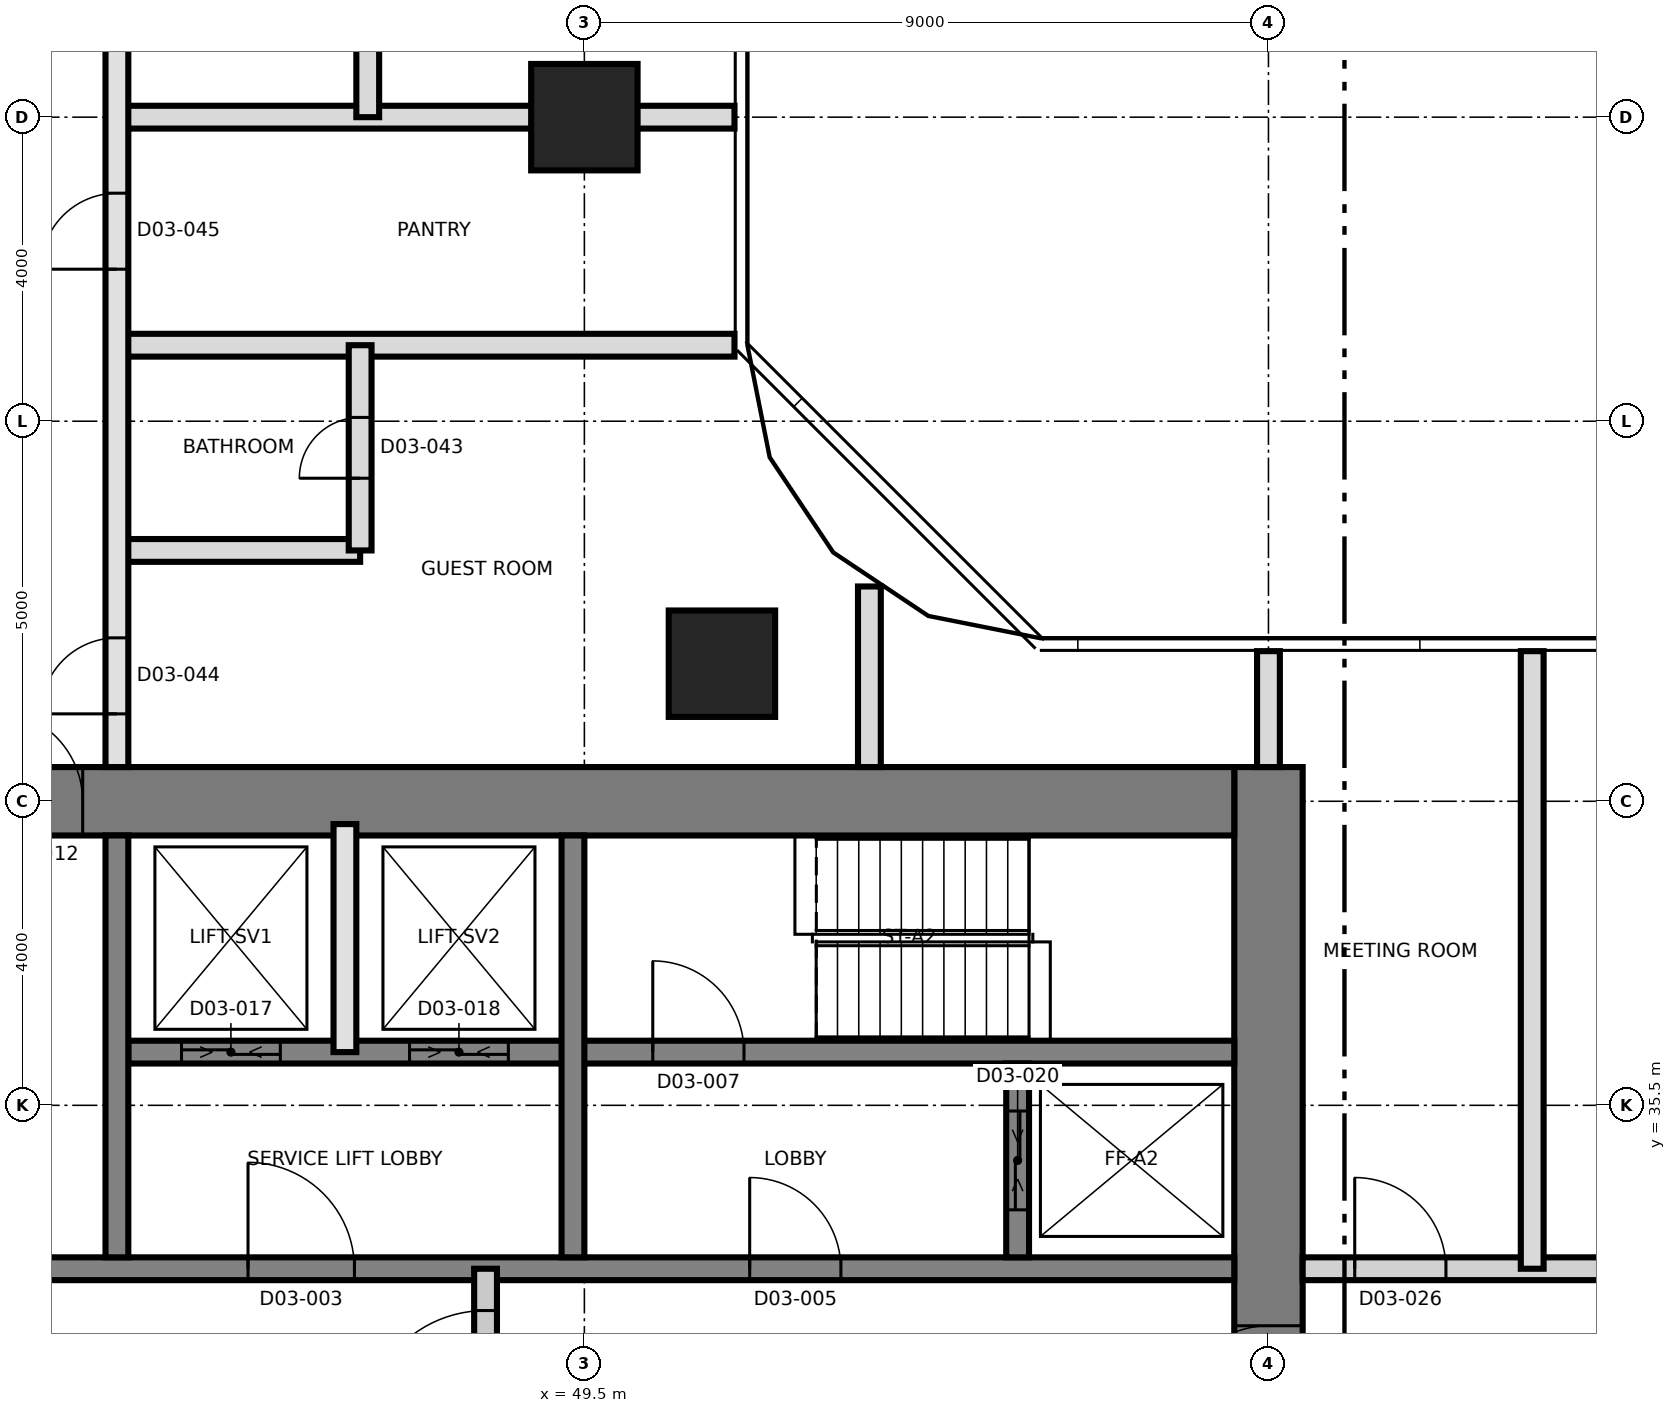
"""IFC4 building model, lengths in metres.
Left out: names, types, materials, properties, quantities, classifications, styles, units other than length and angle.
Written with IfcOpenShell. Run it as: python <this file> out.ifc"""

import sys

from ifc_helpers import new_model, si_unit, direction, frame, frame_2d, origin, origin_2d, place, context, subcontext, project, spatial, rectangle, extrude, element, fill, save


model = new_model("IFC4")
c1 = context("Model", 3, precision=1e-05, world=origin(), true_north=direction((0.0, 1.0)))
c2 = subcontext(c1, "Body", "Model", "MODEL_VIEW")
j1 = project(units=[si_unit("LENGTHUNIT", "METRE"), si_unit("PLANEANGLEUNIT", "RADIAN")], contexts=[c1])
p1 = place(None, origin())
s1 = spatial("IfcSite", under=j1, at=p1, CompositionType="ELEMENT")
p2 = place(p1, origin())
s2 = spatial("IfcBuilding", under=s1, at=p2, CompositionType="ELEMENT")
p3 = place(p2, frame((0.0, 0.0, 52.0)))
s3 = spatial("IfcBuildingStorey", under=s2, at=p3, CompositionType="ELEMENT", Elevation=52.0)
p4 = place(p3, frame((58.5, 21.05, 0.0), z_axis=(0.0, 0.0, 1.0), x_axis=(0.0, 1.0, 0.0)))
e1 = element("IfcWall", 1, at=p4, inside=s3, PredefinedType="SHEAR", context=c2, shape_type="SweptSolid", body=[
    extrude(rectangle(XDim=18.9, YDim=0.9, at=frame_2d((9.45, 0.0))), origin(), (0.0, 0.0, 1.0), 3.7),
])
p5 = place(p4, frame((10.35, 0.0, 0.0)))
e2 = element("IfcOpeningElement", 2, at=p5, cuts=e1, PredefinedType="OPENING", context=c2, shape_type="SweptSolid", body=[
    extrude(rectangle(XDim=1.2, YDim=2.1, at=frame_2d((0.6, 1.05))), frame((0.0, 0.46, 0.0), z_axis=(0.0, -1.0, 0.0), x_axis=(1.0, 0.0, 0.0)), (0.0, 0.0, 1.0), 0.92),
])
p6 = place(p3, frame((31.05, 39.5, 0.0), z_axis=(0.0, 0.0, 1.0), x_axis=(1.0, 0.0, 0.0)))
e3 = element("IfcWall", 3, at=p6, inside=s3, PredefinedType="SHEAR", context=c2, shape_type="SweptSolid", body=[
    extrude(rectangle(XDim=27.0, YDim=0.9, at=frame_2d((13.5, 0.0))), origin(), (0.0, 0.0, 1.0), 3.7),
])
p7 = place(p6, frame((10.65, 0.0, 0.0)))
e4 = element("IfcOpeningElement", 4, at=p7, cuts=e3, PredefinedType="OPENING", context=c2, shape_type="SweptSolid", body=[
    extrude(rectangle(XDim=1.2, YDim=2.1, at=frame_2d((0.6, 1.05))), frame((0.0, 0.46, 0.0), z_axis=(0.0, -1.0, 0.0), x_axis=(1.0, 0.0, 0.0)), (0.0, 0.0, 1.0), 0.92),
])
p8 = place(p3, frame((31.95, 33.35, 0.0), z_axis=(0.0, 0.0, 1.0), x_axis=(1.0, 0.0, 0.0)))
e5 = element("IfcWall", 5, at=p8, inside=s3, PredefinedType="SHEAR", context=c2, shape_type="SweptSolid", body=[
    extrude(rectangle(XDim=26.1, YDim=0.3, at=frame_2d((13.05, 0.0))), origin(), (0.0, 0.0, 1.0), 3.7),
])
p9 = place(p8, frame((13.125, 0.0, 0.0)))
e6 = element("IfcOpeningElement", 6, at=p9, cuts=e5, PredefinedType="OPENING", context=c2, shape_type="SweptSolid", body=[
    extrude(rectangle(XDim=1.4, YDim=2.1, at=frame_2d((0.7, 1.05))), frame((0.0, 0.16, 0.0), z_axis=(0.0, -1.0, 0.0), x_axis=(1.0, 0.0, 0.0)), (0.0, 0.0, 1.0), 0.32),
])
p10 = place(p8, frame((5.175, 0.0, 0.0)))
e7 = element("IfcOpeningElement", 7, at=p10, cuts=e5, PredefinedType="OPENING", context=c2, shape_type="SweptSolid", body=[
    extrude(rectangle(XDim=1.2, YDim=2.1, at=frame_2d((0.6, 1.05))), frame((0.0, 0.16, 0.0), z_axis=(0.0, -1.0, 0.0), x_axis=(1.0, 0.0, 0.0)), (0.0, 0.0, 1.0), 0.32),
])
p11 = place(p8, frame((19.725, 0.0, 0.0)))
e8 = element("IfcOpeningElement", 8, at=p11, cuts=e5, PredefinedType="OPENING", context=c2, shape_type="SweptSolid", body=[
    extrude(rectangle(XDim=1.2, YDim=2.1, at=frame_2d((0.6, 1.05))), frame((0.0, 0.16, 0.0), z_axis=(0.0, -1.0, 0.0), x_axis=(1.0, 0.0, 0.0)), (0.0, 0.0, 1.0), 0.32),
])
p12 = place(p3, frame((43.5, 36.2, 0.0), z_axis=(0.0, 0.0, 1.0), x_axis=(1.0, 0.0, 0.0)))
e9 = element("IfcWall", 9, at=p12, inside=s3, PredefinedType="SHEAR", context=c2, shape_type="SweptSolid", body=[
    extrude(rectangle(XDim=14.55, YDim=0.3, at=frame_2d((7.275, 0.0))), origin(), (0.0, 0.0, 1.0), 3.7),
])
p13 = place(p12, frame((6.9, 0.0, 0.0)))
e10 = element("IfcOpeningElement", 10, at=p13, cuts=e9, PredefinedType="OPENING", context=c2, shape_type="SweptSolid", body=[
    extrude(rectangle(XDim=1.2, YDim=2.1, at=frame_2d((0.6, 1.05))), frame((0.0, 0.16, 0.0), z_axis=(0.0, -1.0, 0.0), x_axis=(1.0, 0.0, 0.0)), (0.0, 0.0, 1.0), 0.32),
])
p14 = place(p12, frame((0.7, 0.0, 0.0)))
e11 = element("IfcOpeningElement", 11, at=p14, cuts=e9, PredefinedType="OPENING", context=c2, shape_type="SweptSolid", body=[
    extrude(rectangle(XDim=1.3, YDim=2.4, at=frame_2d((0.65, 1.2))), frame((0.0, 0.16, 0.0), z_axis=(0.0, -1.0, 0.0), x_axis=(1.0, 0.0, 0.0)), (0.0, 0.0, 1.0), 0.32),
])
p15 = place(p12, frame((3.7, 0.0, 0.0)))
e12 = element("IfcOpeningElement", 12, at=p15, cuts=e9, PredefinedType="OPENING", context=c2, shape_type="SweptSolid", body=[
    extrude(rectangle(XDim=1.3, YDim=2.4, at=frame_2d((0.65, 1.2))), frame((0.0, 0.16, 0.0), z_axis=(0.0, -1.0, 0.0), x_axis=(1.0, 0.0, 0.0)), (0.0, 0.0, 1.0), 0.32),
])
for number, where, z_axis, x_axis in (
    (13, (43.35, 33.5, 0.0), (0.0, 0.0, 1.0), (0.0, 1.0, 0.0)),
    (14, (49.35, 33.5, 0.0), (0.0, 0.0, 1.0), (0.0, 1.0, 0.0)),
):
    element("IfcWall", number, at=place(p3, frame(where, z_axis=z_axis, x_axis=x_axis)), inside=s3, PredefinedType="SHEAR", context=c2, shape_type="SweptSolid", body=[
        extrude(rectangle(XDim=5.55, YDim=0.3, at=frame_2d((2.775, 0.0))), origin(), (0.0, 0.0, 1.0), 3.7),
    ])
p16 = place(p3, frame((55.2, 33.5, 0.0), z_axis=(0.0, 0.0, 1.0), x_axis=(0.0, 1.0, 0.0)))
e15 = element("IfcWall", 15, at=p16, inside=s3, PredefinedType="SHEAR", context=c2, shape_type="SweptSolid", body=[
    extrude(rectangle(XDim=2.55, YDim=0.3, at=frame_2d((1.275, 0.0))), origin(), (0.0, 0.0, 1.0), 3.7),
])
p17 = place(p16, frame((0.625, 0.0, 0.0)))
e16 = element("IfcOpeningElement", 16, at=p17, cuts=e15, PredefinedType="OPENING", context=c2, shape_type="SweptSolid", body=[
    extrude(rectangle(XDim=1.3, YDim=2.4, at=frame_2d((0.65, 1.2))), frame((0.0, 0.16, 0.0), z_axis=(0.0, -1.0, 0.0), x_axis=(1.0, 0.0, 0.0)), (0.0, 0.0, 1.0), 0.32),
])
for number, where, z_axis, x_axis in (
    (17, (51.31, 41.31, 0.0), (0.0, 0.0, 1.0), (1.0, 0.0, 0.0)),
    (18, (49.5, 48.5, 0.0), (0.0, 0.0, 1.0), (1.0, 0.0, 0.0)),
):
    element("IfcColumn", number, at=place(p3, frame(where, z_axis=z_axis, x_axis=x_axis)), inside=s3, PredefinedType="COLUMN", context=c2, shape_type="SweptSolid", body=[
        extrude(rectangle(XDim=1.4, YDim=1.4, at=origin_2d()), origin(), (0.0, 0.0, 1.0), 3.7),
    ])
p18 = place(p3, frame((46.35, 36.2, 0.0), z_axis=(0.0, 0.0, 1.0), x_axis=(0.0, 1.0, 0.0)))
e19 = element("IfcWall", 19, at=p18, inside=s3, PredefinedType="SOLIDWALL", context=c2, shape_type="SweptSolid", body=[
    extrude(rectangle(XDim=3.0, YDim=0.3, at=frame_2d((1.5, 0.0))), origin(), (0.0, 0.0, 1.0), 3.4),
])
p19 = place(p3, frame((48.2, 24.9, 0.0), z_axis=(0.0, 0.0, 1.0), x_axis=(0.0, 1.0, 0.0)))
e20 = element("IfcWall", 20, at=p19, inside=s3, PredefinedType="PARTITIONING", context=c2, shape_type="SweptSolid", body=[
    extrude(rectangle(XDim=8.45, YDim=0.3, at=frame_2d((4.225, 0.0))), origin(), (0.0, 0.0, 1.0), 3.4),
])
p20 = place(p19, frame((6.3, 0.0, 0.0)))
e21 = element("IfcOpeningElement", 21, at=p20, cuts=e20, PredefinedType="OPENING", context=c2, shape_type="SweptSolid", body=[
    extrude(rectangle(XDim=1.6, YDim=2.1, at=frame_2d((0.8, 1.05))), frame((0.0, 0.16, 0.0), z_axis=(0.0, -1.0, 0.0), x_axis=(1.0, 0.0, 0.0)), (0.0, 0.0, 1.0), 0.32),
])
p21 = place(p3, frame((58.95, 33.35, 0.0), z_axis=(0.0, 0.0, 1.0), x_axis=(1.0, 0.0, 0.0)))
e22 = element("IfcWall", 22, at=p21, inside=s3, PredefinedType="PARTITIONING", context=c2, shape_type="SweptSolid", body=[
    extrude(rectangle(XDim=26.38, YDim=0.3, at=frame_2d((13.19, 0.0))), origin(), (0.0, 0.0, 1.0), 3.4),
])
p22 = place(p21, frame((0.685, 0.0, 0.0)))
e23 = element("IfcOpeningElement", 23, at=p22, cuts=e22, PredefinedType="OPENING", context=c2, shape_type="SweptSolid", body=[
    extrude(rectangle(XDim=1.2, YDim=2.1, at=frame_2d((0.6, 1.05))), frame((0.0, 0.16, 0.0), z_axis=(0.0, -1.0, 0.0), x_axis=(1.0, 0.0, 0.0)), (0.0, 0.0, 1.0), 0.32),
])
p23 = place(p21, frame((3.935, 0.0, 0.0)))
e24 = element("IfcOpeningElement", 24, at=p23, cuts=e22, PredefinedType="OPENING", context=c2, shape_type="SweptSolid", body=[
    extrude(rectangle(XDim=1.0, YDim=2.1, at=frame_2d((0.5, 1.05))), frame((0.0, 0.16, 0.0), z_axis=(0.0, -1.0, 0.0), x_axis=(1.0, 0.0, 0.0)), (0.0, 0.0, 1.0), 0.32),
])
p24 = place(p21, frame((14.2, 0.0, 0.0)))
e25 = element("IfcOpeningElement", 25, at=p24, cuts=e22, PredefinedType="OPENING", context=c2, shape_type="SweptSolid", body=[
    extrude(rectangle(XDim=1.0, YDim=2.4, at=frame_2d((0.5, 1.2))), frame((0.0, 0.16, 0.0), z_axis=(0.0, -1.0, 0.0), x_axis=(1.0, 0.0, 0.0)), (0.0, 0.0, 1.0), 0.32),
])
p25 = place(p21, frame((19.25, 0.0, 0.0)))
e26 = element("IfcOpeningElement", 26, at=p25, cuts=e22, PredefinedType="OPENING", context=c2, shape_type="SweptSolid", body=[
    extrude(rectangle(XDim=1.2, YDim=2.1, at=frame_2d((0.6, 1.05))), frame((0.0, 0.16, 0.0), z_axis=(0.0, -1.0, 0.0), x_axis=(1.0, 0.0, 0.0)), (0.0, 0.0, 1.0), 0.32),
])
p26 = place(p21, frame((22.5, 0.0, 0.0)))
e27 = element("IfcOpeningElement", 27, at=p26, cuts=e22, PredefinedType="OPENING", context=c2, shape_type="SweptSolid", body=[
    extrude(rectangle(XDim=1.0, YDim=2.1, at=frame_2d((0.5, 1.05))), frame((0.0, 0.16, 0.0), z_axis=(0.0, -1.0, 0.0), x_axis=(1.0, 0.0, 0.0)), (0.0, 0.0, 1.0), 0.32),
])
p27 = place(p3, frame((43.35, 42.8, 0.0), z_axis=(0.0, 0.0, 1.0), x_axis=(1.0, 0.0, 0.0)))
e28 = element("IfcWall", 28, at=p27, inside=s3, PredefinedType="PARTITIONING", context=c2, shape_type="SweptSolid", body=[
    extrude(rectangle(XDim=3.2, YDim=0.3, at=frame_2d((1.6, 0.0))), origin(), (0.0, 0.0, 1.0), 3.4),
])
for number, where, z_axis, x_axis in (
    (29, (43.35, 45.5, 0.0), (0.0, 0.0, 1.0), (1.0, 0.0, 0.0)),
    (30, (43.35, 48.5, 0.0), (0.0, 0.0, 1.0), (1.0, 0.0, 0.0)),
):
    element("IfcWall", number, at=place(p3, frame(where, z_axis=z_axis, x_axis=x_axis)), inside=s3, PredefinedType="PARTITIONING", context=c2, shape_type="SweptSolid", body=[
        extrude(rectangle(XDim=8.125, YDim=0.3, at=frame_2d((4.062, 0.0))), origin(), (0.0, 0.0, 1.0), 3.4),
    ])
p28 = place(p3, frame((43.35, 39.95, 0.0), z_axis=(0.0, 0.0, 1.0), x_axis=(0.0, 1.0, 0.0)))
e31 = element("IfcWall", 31, at=p28, inside=s3, PredefinedType="SOLIDWALL", context=c2, shape_type="SweptSolid", body=[
    extrude(rectangle(XDim=25.85, YDim=0.3, at=frame_2d((12.925, 0.0))), origin(), (0.0, 0.0, 1.0), 3.4),
])
p29 = place(p28, frame((0.7, 0.0, 0.0)))
e32 = element("IfcOpeningElement", 32, at=p29, cuts=e31, PredefinedType="OPENING", context=c2, shape_type="SweptSolid", body=[
    extrude(rectangle(XDim=1.0, YDim=2.1, at=frame_2d((0.5, 1.05))), frame((0.0, 0.16, 0.0), z_axis=(0.0, -1.0, 0.0), x_axis=(1.0, 0.0, 0.0)), (0.0, 0.0, 1.0), 0.32),
])
p30 = place(p28, frame((6.55, 0.0, 0.0)))
e33 = element("IfcOpeningElement", 33, at=p30, cuts=e31, PredefinedType="OPENING", context=c2, shape_type="SweptSolid", body=[
    extrude(rectangle(XDim=1.0, YDim=2.1, at=frame_2d((0.5, 1.05))), frame((0.0, 0.16, 0.0), z_axis=(0.0, -1.0, 0.0), x_axis=(1.0, 0.0, 0.0)), (0.0, 0.0, 1.0), 0.32),
])
p31 = place(p28, frame((12.55, 0.0, 0.0)))
e34 = element("IfcOpeningElement", 34, at=p31, cuts=e31, PredefinedType="OPENING", context=c2, shape_type="SweptSolid", body=[
    extrude(rectangle(XDim=1.0, YDim=2.4, at=frame_2d((0.5, 1.2))), frame((0.0, 0.16, 0.0), z_axis=(0.0, -1.0, 0.0), x_axis=(1.0, 0.0, 0.0)), (0.0, 0.0, 1.0), 0.32),
])
p32 = place(p28, frame((21.1, 0.0, 0.0)))
e35 = element("IfcOpeningElement", 35, at=p32, cuts=e31, PredefinedType="OPENING", context=c2, shape_type="SweptSolid", body=[
    extrude(rectangle(XDim=1.0, YDim=2.4, at=frame_2d((0.5, 1.2))), frame((0.0, 0.16, 0.0), z_axis=(0.0, -1.0, 0.0), x_axis=(1.0, 0.0, 0.0)), (0.0, 0.0, 1.0), 0.32),
])
p33 = place(p3, frame((46.55, 42.8, 0.0), z_axis=(0.0, 0.0, 1.0), x_axis=(0.0, 1.0, 0.0)))
e36 = element("IfcWall", 36, at=p33, inside=s3, PredefinedType="PARTITIONING", context=c2, shape_type="SweptSolid", body=[
    extrude(rectangle(XDim=2.7, YDim=0.3, at=frame_2d((1.35, 0.0))), origin(), (0.0, 0.0, 1.0), 3.4),
])
p34 = place(p33, frame((0.95, 0.0, 0.0)))
e37 = element("IfcOpeningElement", 37, at=p34, cuts=e36, PredefinedType="OPENING", context=c2, shape_type="SweptSolid", body=[
    extrude(rectangle(XDim=0.8, YDim=2.1, at=frame_2d((0.4, 1.05))), frame((0.0, 0.16, 0.0), z_axis=(0.0, -1.0, 0.0), x_axis=(1.0, 0.0, 0.0)), (0.0, 0.0, 1.0), 0.32),
])
p35 = place(p3, frame((46.65, 48.5, 0.0), z_axis=(0.0, 0.0, 1.0), x_axis=(0.0, 1.0, 0.0)))
e38 = element("IfcWall", 38, at=p35, inside=s3, PredefinedType="PARTITIONING", context=c2, shape_type="SweptSolid", body=[
    extrude(rectangle(XDim=3.0, YDim=0.3, at=frame_2d((1.5, 0.0))), origin(), (0.0, 0.0, 1.0), 3.4),
])
p36 = place(p35, frame((1.1, 0.0, 0.0)))
e39 = element("IfcOpeningElement", 39, at=p36, cuts=e38, PredefinedType="OPENING", context=c2, shape_type="SweptSolid", body=[
    extrude(rectangle(XDim=0.8, YDim=2.1, at=frame_2d((0.4, 1.05))), frame((0.0, 0.16, 0.0), z_axis=(0.0, -1.0, 0.0), x_axis=(1.0, 0.0, 0.0)), (0.0, 0.0, 1.0), 0.32),
])
p37 = place(p3, frame((53.25, 39.95, 0.0), z_axis=(0.0, 0.0, 1.0), x_axis=(0.0, 1.0, 0.0)))
e40 = element("IfcWall", 40, at=p37, inside=s3, PredefinedType="PARTITIONING", context=c2, shape_type="SweptSolid", body=[
    extrude(rectangle(XDim=2.376, YDim=0.3, at=frame_2d((1.188, 0.0))), origin(), (0.0, 0.0, 1.0), 3.4),
])
p38 = place(p3, frame((58.5, 39.95, 0.0), z_axis=(0.0, 0.0, 1.0), x_axis=(0.0, 1.0, 0.0)))
e41 = element("IfcWall", 41, at=p38, inside=s3, PredefinedType="PARTITIONING", context=c2, shape_type="SweptSolid", body=[
    extrude(rectangle(XDim=1.525, YDim=0.3, at=frame_2d((0.763, 0.0))), origin(), (0.0, 0.0, 1.0), 3.4),
])
p39 = place(p3, frame((61.97, 33.35, 0.0), z_axis=(0.0, 0.0, 1.0), x_axis=(0.0, 1.0, 0.0)))
e42 = element("IfcWall", 42, at=p39, inside=s3, PredefinedType="PARTITIONING", context=c2, shape_type="SweptSolid", body=[
    extrude(rectangle(XDim=8.125, YDim=0.3, at=frame_2d((4.062, 0.0))), origin(), (0.0, 0.0, 1.0), 3.4),
])
p40 = place(p20, origin())
e43 = element("IfcDoor", 43, at=p40, inside=s3, OperationType="SINGLE_SWING_LEFT", PredefinedType="DOOR", context=c2, shape_type="SweptSolid", body=[
    extrude(rectangle(XDim=1.6, YDim=2.1, at=frame_2d((0.8, 1.05))), frame((0.0, 0.025, 0.0), z_axis=(0.0, -1.0, 0.0), x_axis=(1.0, 0.0, 0.0)), (0.0, 0.0, 1.0), 0.05),
])
fill(e21, e43)
p41 = place(p9, origin())
e44 = element("IfcDoor", 44, at=p41, inside=s3, OperationType="SINGLE_SWING_RIGHT", PredefinedType="DOOR", context=c2, shape_type="SweptSolid", body=[
    extrude(rectangle(XDim=1.4, YDim=2.1, at=frame_2d((0.7, 1.05))), frame((0.0, 0.025, 0.0), z_axis=(0.0, -1.0, 0.0), x_axis=(1.0, 0.0, 0.0)), (0.0, 0.0, 1.0), 0.05),
])
fill(e6, e44)
p42 = place(p11, origin())
e45 = element("IfcDoor", 45, at=p42, inside=s3, OperationType="SINGLE_SWING_RIGHT", PredefinedType="DOOR", context=c2, shape_type="SweptSolid", body=[
    extrude(rectangle(XDim=1.2, YDim=2.1, at=frame_2d((0.6, 1.05))), frame((0.0, 0.025, 0.0), z_axis=(0.0, -1.0, 0.0), x_axis=(1.0, 0.0, 0.0)), (0.0, 0.0, 1.0), 0.05),
])
fill(e8, e45)
p43 = place(p13, origin())
e46 = element("IfcDoor", 46, at=p43, inside=s3, OperationType="SINGLE_SWING_LEFT", PredefinedType="DOOR", context=c2, shape_type="SweptSolid", body=[
    extrude(rectangle(XDim=1.2, YDim=2.1, at=frame_2d((0.6, 1.05))), frame((0.0, 0.025, 0.0), z_axis=(0.0, -1.0, 0.0), x_axis=(1.0, 0.0, 0.0)), (0.0, 0.0, 1.0), 0.05),
])
fill(e10, e46)
p44 = place(p5, origin())
e47 = element("IfcDoor", 47, at=p44, inside=s3, OperationType="SINGLE_SWING_LEFT", PredefinedType="DOOR", context=c2, shape_type="SweptSolid", body=[
    extrude(rectangle(XDim=1.2, YDim=2.1, at=frame_2d((0.6, 1.05))), frame((0.0, 0.025, 0.0), z_axis=(0.0, -1.0, 0.0), x_axis=(1.0, 0.0, 0.0)), (0.0, 0.0, 1.0), 0.05),
])
fill(e2, e47)
p45 = place(p7, origin())
e48 = element("IfcDoor", 48, at=p45, inside=s3, OperationType="SINGLE_SWING_RIGHT", PredefinedType="DOOR", context=c2, shape_type="SweptSolid", body=[
    extrude(rectangle(XDim=1.2, YDim=2.1, at=frame_2d((0.6, 1.05))), frame((0.0, 0.025, 0.0), z_axis=(0.0, -1.0, 0.0), x_axis=(1.0, 0.0, 0.0)), (0.0, 0.0, 1.0), 0.05),
])
fill(e4, e48)
p46 = place(p14, origin())
e49 = element("IfcDoor", 49, at=p46, inside=s3, OperationType="SLIDING_TO_LEFT", PredefinedType="DOOR", context=c2, shape_type="SweptSolid", body=[
    extrude(rectangle(XDim=1.3, YDim=2.4, at=frame_2d((0.65, 1.2))), frame((0.0, 0.025, 0.0), z_axis=(0.0, -1.0, 0.0), x_axis=(1.0, 0.0, 0.0)), (0.0, 0.0, 1.0), 0.05),
])
fill(e11, e49)
p47 = place(p15, origin())
e50 = element("IfcDoor", 50, at=p47, inside=s3, OperationType="SLIDING_TO_LEFT", PredefinedType="DOOR", context=c2, shape_type="SweptSolid", body=[
    extrude(rectangle(XDim=1.3, YDim=2.4, at=frame_2d((0.65, 1.2))), frame((0.0, 0.025, 0.0), z_axis=(0.0, -1.0, 0.0), x_axis=(1.0, 0.0, 0.0)), (0.0, 0.0, 1.0), 0.05),
])
fill(e12, e50)
p48 = place(p17, origin())
e51 = element("IfcDoor", 51, at=p48, inside=s3, OperationType="SLIDING_TO_LEFT", PredefinedType="DOOR", context=c2, shape_type="SweptSolid", body=[
    extrude(rectangle(XDim=1.3, YDim=2.4, at=frame_2d((0.65, 1.2))), frame((0.0, 0.025, 0.0), z_axis=(0.0, -1.0, 0.0), x_axis=(1.0, 0.0, 0.0)), (0.0, 0.0, 1.0), 0.05),
])
fill(e16, e51)
p49 = place(p22, origin())
e52 = element("IfcDoor", 52, at=p49, inside=s3, OperationType="SINGLE_SWING_LEFT", PredefinedType="DOOR", context=c2, shape_type="SweptSolid", body=[
    extrude(rectangle(XDim=1.2, YDim=2.1, at=frame_2d((0.6, 1.05))), frame((0.0, 0.025, 0.0), z_axis=(0.0, -1.0, 0.0), x_axis=(1.0, 0.0, 0.0)), (0.0, 0.0, 1.0), 0.05),
])
fill(e23, e52)
p50 = place(p34, origin())
e53 = element("IfcDoor", 53, at=p50, inside=s3, OperationType="SINGLE_SWING_LEFT", PredefinedType="DOOR", context=c2, shape_type="SweptSolid", body=[
    extrude(rectangle(XDim=0.8, YDim=2.1, at=frame_2d((0.4, 1.05))), frame((0.0, 0.025, 0.0), z_axis=(0.0, -1.0, 0.0), x_axis=(1.0, 0.0, 0.0)), (0.0, 0.0, 1.0), 0.05),
])
fill(e37, e53)
p51 = place(p29, origin())
e54 = element("IfcDoor", 54, at=p51, inside=s3, OperationType="SINGLE_SWING_RIGHT", PredefinedType="DOOR", context=c2, shape_type="SweptSolid", body=[
    extrude(rectangle(XDim=1.0, YDim=2.1, at=frame_2d((0.5, 1.05))), frame((0.0, 0.025, 0.0), z_axis=(0.0, -1.0, 0.0), x_axis=(1.0, 0.0, 0.0)), (0.0, 0.0, 1.0), 0.05),
])
fill(e32, e54)
p52 = place(p30, origin())
e55 = element("IfcDoor", 55, at=p52, inside=s3, OperationType="SINGLE_SWING_LEFT", PredefinedType="DOOR", context=c2, shape_type="SweptSolid", body=[
    extrude(rectangle(XDim=1.0, YDim=2.1, at=frame_2d((0.5, 1.05))), frame((0.0, 0.025, 0.0), z_axis=(0.0, -1.0, 0.0), x_axis=(1.0, 0.0, 0.0)), (0.0, 0.0, 1.0), 0.05),
])
fill(e33, e55)
save(model, sys.argv[1])
